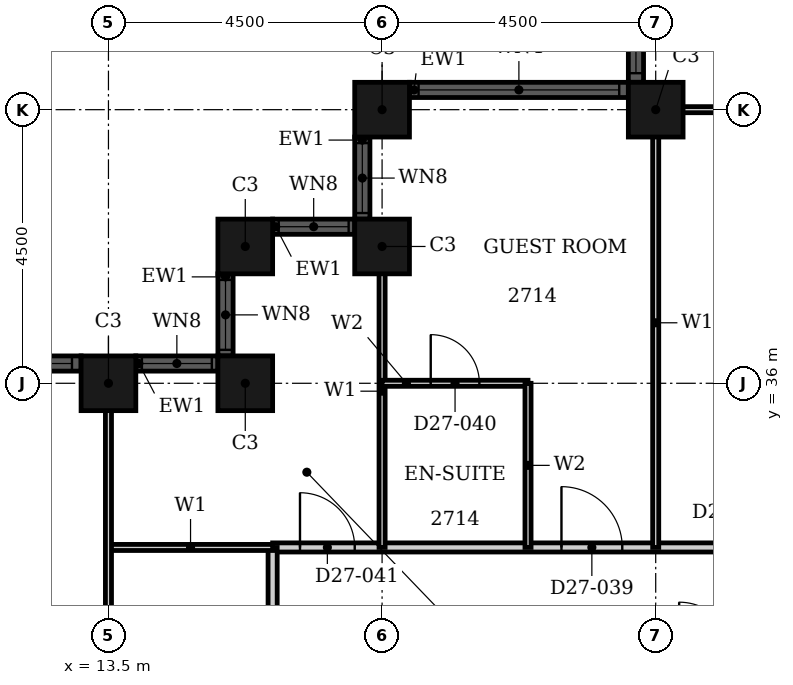
"""IFC4 building model, lengths in metres.
Left out: names, types, materials, properties, quantities, classifications, styles, units other than length and angle.
Written with IfcOpenShell. Run it as: python <this file> out.ifc"""

import sys

from ifc_helpers import new_model, si_unit, direction, frame, frame_2d, origin, origin_2d, place, context, subcontext, project, spatial, rectangle, hollow_rectangle, extrude, element, fill, save


model = new_model("IFC4")
c1 = context("Model", 3, precision=1e-05, world=origin(), true_north=direction((0.0, 1.0)))
c2 = subcontext(c1, "Body", "Model", "MODEL_VIEW")
j1 = project(units=[si_unit("LENGTHUNIT", "METRE"), si_unit("PLANEANGLEUNIT", "RADIAN")], contexts=[c1])
p1 = place(None, origin())
s1 = spatial("IfcSite", under=j1, at=p1, CompositionType="ELEMENT")
p2 = place(p1, origin())
s2 = spatial("IfcBuilding", under=s1, at=p2, CompositionType="ELEMENT")
p3 = place(p2, frame((0.0, 0.0, 111.6)))
s3 = spatial("IfcBuildingStorey", under=s2, at=p3, CompositionType="ELEMENT", Elevation=111.6)
for number, where, z_axis, x_axis in (
    (1, (22.5, 40.5, 0.0), (0.0, 0.0, 1.0), (1.0, 0.0, 0.0)),
    (2, (18.0, 40.5, 0.0), (0.0, 0.0, 1.0), (1.0, 0.0, 0.0)),
    (3, (18.0, 38.25, 0.0), (0.0, 0.0, 1.0), (1.0, 0.0, 0.0)),
    (4, (15.75, 38.25, 0.0), (0.0, 0.0, 1.0), (1.0, 0.0, 0.0)),
    (5, (15.75, 36.0, 0.0), (0.0, 0.0, 1.0), (1.0, 0.0, 0.0)),
    (6, (13.5, 36.0, 0.0), (0.0, 0.0, 1.0), (1.0, 0.0, 0.0)),
):
    element("IfcColumn", number, at=place(p3, frame(where, z_axis=z_axis, x_axis=x_axis)), inside=s3, PredefinedType="COLUMN", context=c2, shape_type="SweptSolid", body=[
        extrude(hollow_rectangle(XDim=0.9, YDim=0.9, WallThickness=0.028, at=origin_2d()), origin(), (0.0, 0.0, 1.0), 3.6),
    ])
p4 = place(p3, frame((22.175, 49.05, 0.0), z_axis=(0.0, 0.0, 1.0), x_axis=(0.0, -1.0, 0.0)))
e7 = element("IfcWall", 7, at=p4, inside=s3, PredefinedType="SOLIDWALL", context=c2, shape_type="SweptSolid", body=[
    extrude(rectangle(XDim=8.1, YDim=0.25, at=frame_2d((4.05, 0.0))), origin(), (0.0, 0.0, 1.0), 3.6),
])
p5 = place(p4, frame((0.15, 0.0, 0.9)))
e8 = element("IfcOpeningElement", 8, at=p5, cuts=e7, PredefinedType="OPENING", context=c2, shape_type="SweptSolid", body=[
    extrude(rectangle(XDim=3.3, YDim=2.08, at=frame_2d((1.65, 1.04))), frame((0.0, 0.135, 0.0), z_axis=(0.0, -1.0, 0.0), x_axis=(1.0, 0.0, 0.0)), (0.0, 0.0, 1.0), 0.27),
])
p6 = place(p4, frame((4.65, 0.0, 0.9)))
e9 = element("IfcOpeningElement", 9, at=p6, cuts=e7, PredefinedType="OPENING", context=c2, shape_type="SweptSolid", body=[
    extrude(rectangle(XDim=3.3, YDim=2.08, at=frame_2d((1.65, 1.04))), frame((0.0, 0.135, 0.0), z_axis=(0.0, -1.0, 0.0), x_axis=(1.0, 0.0, 0.0)), (0.0, 0.0, 1.0), 0.27),
])
p7 = place(p3, frame((22.05, 40.825, 0.0), z_axis=(0.0, 0.0, 1.0), x_axis=(-1.0, 0.0, 0.0)))
e10 = element("IfcWall", 10, at=p7, inside=s3, PredefinedType="SOLIDWALL", context=c2, shape_type="SweptSolid", body=[
    extrude(rectangle(XDim=3.6, YDim=0.25, at=frame_2d((1.8, 0.0))), origin(), (0.0, 0.0, 1.0), 3.6),
])
p8 = place(p7, frame((0.15, 0.0, 0.9)))
e11 = element("IfcOpeningElement", 11, at=p8, cuts=e10, PredefinedType="OPENING", context=c2, shape_type="SweptSolid", body=[
    extrude(rectangle(XDim=3.3, YDim=2.08, at=frame_2d((1.65, 1.04))), frame((0.0, 0.135, 0.0), z_axis=(0.0, -1.0, 0.0), x_axis=(1.0, 0.0, 0.0)), (0.0, 0.0, 1.0), 0.27),
])
p9 = place(p3, frame((17.675, 40.05, 0.0), z_axis=(0.0, 0.0, 1.0), x_axis=(0.0, -1.0, 0.0)))
e12 = element("IfcWall", 12, at=p9, inside=s3, PredefinedType="SOLIDWALL", context=c2, shape_type="SweptSolid", body=[
    extrude(rectangle(XDim=1.35, YDim=0.25, at=frame_2d((0.675, 0.0))), origin(), (0.0, 0.0, 1.0), 3.6),
])
p10 = place(p9, frame((0.1, 0.0, 0.9)))
e13 = element("IfcOpeningElement", 13, at=p10, cuts=e12, PredefinedType="OPENING", context=c2, shape_type="SweptSolid", body=[
    extrude(rectangle(XDim=1.15, YDim=2.08, at=frame_2d((0.575, 1.04))), frame((0.0, 0.135, 0.0), z_axis=(0.0, -1.0, 0.0), x_axis=(1.0, 0.0, 0.0)), (0.0, 0.0, 1.0), 0.27),
])
p11 = place(p3, frame((17.55, 38.575, 0.0), z_axis=(0.0, 0.0, 1.0), x_axis=(-1.0, 0.0, 0.0)))
e14 = element("IfcWall", 14, at=p11, inside=s3, PredefinedType="SOLIDWALL", context=c2, shape_type="SweptSolid", body=[
    extrude(rectangle(XDim=1.35, YDim=0.25, at=frame_2d((0.675, 0.0))), origin(), (0.0, 0.0, 1.0), 3.6),
])
p12 = place(p11, frame((0.1, 0.0, 0.9)))
e15 = element("IfcOpeningElement", 15, at=p12, cuts=e14, PredefinedType="OPENING", context=c2, shape_type="SweptSolid", body=[
    extrude(rectangle(XDim=1.15, YDim=2.08, at=frame_2d((0.575, 1.04))), frame((0.0, 0.135, 0.0), z_axis=(0.0, -1.0, 0.0), x_axis=(1.0, 0.0, 0.0)), (0.0, 0.0, 1.0), 0.27),
])
p13 = place(p3, frame((15.425, 37.8, 0.0), z_axis=(0.0, 0.0, 1.0), x_axis=(0.0, -1.0, 0.0)))
e16 = element("IfcWall", 16, at=p13, inside=s3, PredefinedType="SOLIDWALL", context=c2, shape_type="SweptSolid", body=[
    extrude(rectangle(XDim=1.35, YDim=0.25, at=frame_2d((0.675, 0.0))), origin(), (0.0, 0.0, 1.0), 3.6),
])
p14 = place(p13, frame((0.1, 0.0, 0.9)))
e17 = element("IfcOpeningElement", 17, at=p14, cuts=e16, PredefinedType="OPENING", context=c2, shape_type="SweptSolid", body=[
    extrude(rectangle(XDim=1.15, YDim=2.08, at=frame_2d((0.575, 1.04))), frame((0.0, 0.135, 0.0), z_axis=(0.0, -1.0, 0.0), x_axis=(1.0, 0.0, 0.0)), (0.0, 0.0, 1.0), 0.27),
])
p15 = place(p3, frame((15.3, 36.325, 0.0), z_axis=(0.0, 0.0, 1.0), x_axis=(-1.0, 0.0, 0.0)))
e18 = element("IfcWall", 18, at=p15, inside=s3, PredefinedType="SOLIDWALL", context=c2, shape_type="SweptSolid", body=[
    extrude(rectangle(XDim=1.35, YDim=0.25, at=frame_2d((0.675, 0.0))), origin(), (0.0, 0.0, 1.0), 3.6),
])
p16 = place(p15, frame((0.1, 0.0, 0.9)))
e19 = element("IfcOpeningElement", 19, at=p16, cuts=e18, PredefinedType="OPENING", context=c2, shape_type="SweptSolid", body=[
    extrude(rectangle(XDim=1.15, YDim=2.08, at=frame_2d((0.575, 1.04))), frame((0.0, 0.135, 0.0), z_axis=(0.0, -1.0, 0.0), x_axis=(1.0, 0.0, 0.0)), (0.0, 0.0, 1.0), 0.27),
])
p17 = place(p3, frame((13.05, 36.325, 0.0), z_axis=(0.0, 0.0, 1.0), x_axis=(-1.0, 0.0, 0.0)))
e20 = element("IfcWall", 20, at=p17, inside=s3, PredefinedType="SOLIDWALL", context=c2, shape_type="SweptSolid", body=[
    extrude(rectangle(XDim=8.1, YDim=0.25, at=frame_2d((4.05, 0.0))), origin(), (0.0, 0.0, 1.0), 3.6),
])
p18 = place(p17, frame((0.15, 0.0, 0.9)))
e21 = element("IfcOpeningElement", 21, at=p18, cuts=e20, PredefinedType="OPENING", context=c2, shape_type="SweptSolid", body=[
    extrude(rectangle(XDim=3.3, YDim=2.08, at=frame_2d((1.65, 1.04))), frame((0.0, 0.135, 0.0), z_axis=(0.0, -1.0, 0.0), x_axis=(1.0, 0.0, 0.0)), (0.0, 0.0, 1.0), 0.27),
])
p19 = place(p17, frame((4.65, 0.0, 0.9)))
e22 = element("IfcOpeningElement", 22, at=p19, cuts=e20, PredefinedType="OPENING", context=c2, shape_type="SweptSolid", body=[
    extrude(rectangle(XDim=3.3, YDim=2.08, at=frame_2d((1.65, 1.04))), frame((0.0, 0.135, 0.0), z_axis=(0.0, -1.0, 0.0), x_axis=(1.0, 0.0, 0.0)), (0.0, 0.0, 1.0), 0.27),
])
p20 = place(p3, frame((16.2, 33.3, 0.0), z_axis=(0.0, 0.0, 1.0), x_axis=(1.0, 0.0, 0.0)))
e23 = element("IfcWall", 23, at=p20, inside=s3, PredefinedType="PARTITIONING", context=c2, shape_type="SweptSolid", body=[
    extrude(rectangle(XDim=15.3, YDim=0.15, at=frame_2d((7.65, 0.0))), origin(), (0.0, 0.0, 1.0), 3.3),
])
p21 = place(p20, frame((4.75, 0.0, 0.0)))
e24 = element("IfcOpeningElement", 24, at=p21, cuts=e23, PredefinedType="OPENING", context=c2, shape_type="SweptSolid", body=[
    extrude(rectangle(XDim=1.0, YDim=2.1, at=frame_2d((0.5, 1.05))), frame((0.0, 0.085, 0.0), z_axis=(0.0, -1.0, 0.0), x_axis=(1.0, 0.0, 0.0)), (0.0, 0.0, 1.0), 0.17),
])
p22 = place(p20, frame((0.45, 0.0, 0.0)))
e25 = element("IfcOpeningElement", 25, at=p22, cuts=e23, PredefinedType="OPENING", context=c2, shape_type="SweptSolid", body=[
    extrude(rectangle(XDim=0.9, YDim=2.1, at=frame_2d((0.45, 1.05))), frame((0.0, 0.085, 0.0), z_axis=(0.0, -1.0, 0.0), x_axis=(1.0, 0.0, 0.0)), (0.0, 0.0, 1.0), 0.17),
])
p23 = place(p20, frame((10.35, 0.0, 0.0)))
e26 = element("IfcOpeningElement", 26, at=p23, cuts=e23, PredefinedType="OPENING", context=c2, shape_type="SweptSolid", body=[
    extrude(rectangle(XDim=0.9, YDim=2.1, at=frame_2d((0.45, 1.05))), frame((0.0, 0.085, 0.0), z_axis=(0.0, -1.0, 0.0), x_axis=(1.0, 0.0, 0.0)), (0.0, 0.0, 1.0), 0.17),
])
p24 = place(p3, frame((16.2, 27.0, 0.0), z_axis=(0.0, 0.0, 1.0), x_axis=(0.0, 1.0, 0.0)))
e27 = element("IfcWall", 27, at=p24, inside=s3, PredefinedType="PARTITIONING", context=c2, shape_type="SweptSolid", body=[
    extrude(rectangle(XDim=6.3, YDim=0.15, at=frame_2d((3.15, 0.0))), origin(), (0.0, 0.0, 1.0), 3.3),
])
p25 = place(p24, frame((2.55, 0.0, 0.0)))
e28 = element("IfcOpeningElement", 28, at=p25, cuts=e27, PredefinedType="OPENING", context=c2, shape_type="SweptSolid", body=[
    extrude(rectangle(XDim=0.9, YDim=2.1, at=frame_2d((0.45, 1.05))), frame((0.0, 0.085, 0.0), z_axis=(0.0, -1.0, 0.0), x_axis=(1.0, 0.0, 0.0)), (0.0, 0.0, 1.0), 0.17),
])
p26 = place(p3, frame((13.5, 33.3, 0.0), z_axis=(0.0, 0.0, 1.0), x_axis=(1.0, 0.0, 0.0)))
e29 = element("IfcWall", 29, at=p26, inside=s3, PredefinedType="PARTITIONING", context=c2, shape_type="SweptSolid", body=[
    extrude(rectangle(XDim=2.7, YDim=0.1, at=frame_2d((1.35, 0.0))), origin(), (0.0, 0.0, 1.0), 3.3),
])
for number, where, z_axis, x_axis in (
    (30, (22.31, 40.5, 0.0), (0.0, 0.0, 1.0), (1.0, 0.0, 0.0)),
    (31, (13.5, 27.0, 0.0), (0.0, 0.0, 1.0), (0.0, 1.0, 0.0)),
):
    element("IfcWall", number, at=place(p3, frame(where, z_axis=z_axis, x_axis=x_axis)), inside=s3, PredefinedType="PARTITIONING", context=c2, shape_type="SweptSolid", body=[
        extrude(rectangle(XDim=9.19, YDim=0.1, at=frame_2d((4.595, 0.0))), origin(), (0.0, 0.0, 1.0), 2.38),
    ])
p27 = place(p3, frame((18.0, 33.3, 0.0), z_axis=(0.0, 0.0, 1.0), x_axis=(0.0, 1.0, 0.0)))
e32 = element("IfcWall", 32, at=p27, inside=s3, PredefinedType="PARTITIONING", context=c2, shape_type="SweptSolid", body=[
    extrude(rectangle(XDim=5.14, YDim=0.1, at=frame_2d((2.57, 0.0))), origin(), (0.0, 0.0, 1.0), 3.3),
])
p28 = place(p3, frame((22.5, 33.3, 0.0), z_axis=(0.0, 0.0, 1.0), x_axis=(0.0, 1.0, 0.0)))
e33 = element("IfcWall", 33, at=p28, inside=s3, PredefinedType="PARTITIONING", context=c2, shape_type="SweptSolid", body=[
    extrude(rectangle(XDim=7.39, YDim=0.1, at=frame_2d((3.695, 0.0))), origin(), (0.0, 0.0, 1.0), 3.3),
])
p29 = place(p3, frame((18.0, 36.0, 0.0), z_axis=(0.0, 0.0, 1.0), x_axis=(1.0, 0.0, 0.0)))
e34 = element("IfcWall", 34, at=p29, inside=s3, PredefinedType="PARTITIONING", context=c2, shape_type="SweptSolid", body=[
    extrude(rectangle(XDim=2.4, YDim=0.1, at=frame_2d((1.2, 0.0))), origin(), (0.0, 0.0, 1.0), 3.3),
])
p30 = place(p29, frame((0.8, 0.0, 0.0)))
e35 = element("IfcOpeningElement", 35, at=p30, cuts=e34, PredefinedType="OPENING", context=c2, shape_type="SweptSolid", body=[
    extrude(rectangle(XDim=0.8, YDim=2.1, at=frame_2d((0.4, 1.05))), frame((0.0, 0.06, 0.0), z_axis=(0.0, -1.0, 0.0), x_axis=(1.0, 0.0, 0.0)), (0.0, 0.0, 1.0), 0.12),
])
p31 = place(p3, frame((20.4, 33.3, 0.0), z_axis=(0.0, 0.0, 1.0), x_axis=(0.0, 1.0, 0.0)))
e36 = element("IfcWall", 36, at=p31, inside=s3, PredefinedType="PARTITIONING", context=c2, shape_type="SweptSolid", body=[
    extrude(rectangle(XDim=2.7, YDim=0.1, at=frame_2d((1.35, 0.0))), origin(), (0.0, 0.0, 1.0), 3.3),
])
p32 = place(p6, origin())
e37 = element("IfcWindow", 37, at=p32, inside=s3, PartitioningType="SINGLE_PANEL", PredefinedType="WINDOW", context=c2, shape_type="SweptSolid", body=[
    extrude(rectangle(XDim=3.3, YDim=2.08, at=frame_2d((1.65, 1.04))), frame((0.0, 0.03, 0.0), z_axis=(0.0, -1.0, 0.0), x_axis=(1.0, 0.0, 0.0)), (0.0, 0.0, 1.0), 0.06),
])
fill(e9, e37)
p33 = place(p8, origin())
e38 = element("IfcWindow", 38, at=p33, inside=s3, PartitioningType="SINGLE_PANEL", PredefinedType="WINDOW", context=c2, shape_type="SweptSolid", body=[
    extrude(rectangle(XDim=3.3, YDim=2.08, at=frame_2d((1.65, 1.04))), frame((0.0, 0.03, 0.0), z_axis=(0.0, -1.0, 0.0), x_axis=(1.0, 0.0, 0.0)), (0.0, 0.0, 1.0), 0.06),
])
fill(e11, e38)
p34 = place(p10, origin())
e39 = element("IfcWindow", 39, at=p34, inside=s3, PartitioningType="SINGLE_PANEL", PredefinedType="WINDOW", context=c2, shape_type="SweptSolid", body=[
    extrude(rectangle(XDim=1.15, YDim=2.08, at=frame_2d((0.575, 1.04))), frame((0.0, 0.03, 0.0), z_axis=(0.0, -1.0, 0.0), x_axis=(1.0, 0.0, 0.0)), (0.0, 0.0, 1.0), 0.06),
])
fill(e13, e39)
p35 = place(p12, origin())
e40 = element("IfcWindow", 40, at=p35, inside=s3, PartitioningType="SINGLE_PANEL", PredefinedType="WINDOW", context=c2, shape_type="SweptSolid", body=[
    extrude(rectangle(XDim=1.15, YDim=2.08, at=frame_2d((0.575, 1.04))), frame((0.0, 0.03, 0.0), z_axis=(0.0, -1.0, 0.0), x_axis=(1.0, 0.0, 0.0)), (0.0, 0.0, 1.0), 0.06),
])
fill(e15, e40)
p36 = place(p14, origin())
e41 = element("IfcWindow", 41, at=p36, inside=s3, PartitioningType="SINGLE_PANEL", PredefinedType="WINDOW", context=c2, shape_type="SweptSolid", body=[
    extrude(rectangle(XDim=1.15, YDim=2.08, at=frame_2d((0.575, 1.04))), frame((0.0, 0.03, 0.0), z_axis=(0.0, -1.0, 0.0), x_axis=(1.0, 0.0, 0.0)), (0.0, 0.0, 1.0), 0.06),
])
fill(e17, e41)
p37 = place(p16, origin())
e42 = element("IfcWindow", 42, at=p37, inside=s3, PartitioningType="SINGLE_PANEL", PredefinedType="WINDOW", context=c2, shape_type="SweptSolid", body=[
    extrude(rectangle(XDim=1.15, YDim=2.08, at=frame_2d((0.575, 1.04))), frame((0.0, 0.03, 0.0), z_axis=(0.0, -1.0, 0.0), x_axis=(1.0, 0.0, 0.0)), (0.0, 0.0, 1.0), 0.06),
])
fill(e19, e42)
p38 = place(p18, origin())
e43 = element("IfcWindow", 43, at=p38, inside=s3, PartitioningType="SINGLE_PANEL", PredefinedType="WINDOW", context=c2, shape_type="SweptSolid", body=[
    extrude(rectangle(XDim=3.3, YDim=2.08, at=frame_2d((1.65, 1.04))), frame((0.0, 0.03, 0.0), z_axis=(0.0, -1.0, 0.0), x_axis=(1.0, 0.0, 0.0)), (0.0, 0.0, 1.0), 0.06),
])
fill(e21, e43)
p39 = place(p21, origin())
e44 = element("IfcDoor", 44, at=p39, inside=s3, OperationType="SINGLE_SWING_RIGHT", PredefinedType="DOOR", context=c2, shape_type="SweptSolid", body=[
    extrude(rectangle(XDim=1.0, YDim=2.1, at=frame_2d((0.5, 1.05))), frame((0.0, 0.025, 0.0), z_axis=(0.0, -1.0, 0.0), x_axis=(1.0, 0.0, 0.0)), (0.0, 0.0, 1.0), 0.05),
])
fill(e24, e44)
p40 = place(p30, origin())
e45 = element("IfcDoor", 45, at=p40, inside=s3, OperationType="SINGLE_SWING_LEFT", PredefinedType="DOOR", context=c2, shape_type="SweptSolid", body=[
    extrude(rectangle(XDim=0.8, YDim=2.1, at=frame_2d((0.4, 1.05))), frame((0.0, 0.025, 0.0), z_axis=(0.0, -1.0, 0.0), x_axis=(1.0, 0.0, 0.0)), (0.0, 0.0, 1.0), 0.05),
])
fill(e35, e45)
p41 = place(p22, origin())
e46 = element("IfcDoor", 46, at=p41, inside=s3, OperationType="SINGLE_SWING_LEFT", PredefinedType="DOOR", context=c2, shape_type="SweptSolid", body=[
    extrude(rectangle(XDim=0.9, YDim=2.1, at=frame_2d((0.45, 1.05))), frame((0.0, 0.025, 0.0), z_axis=(0.0, -1.0, 0.0), x_axis=(1.0, 0.0, 0.0)), (0.0, 0.0, 1.0), 0.05),
])
fill(e25, e46)
save(model, sys.argv[1])
